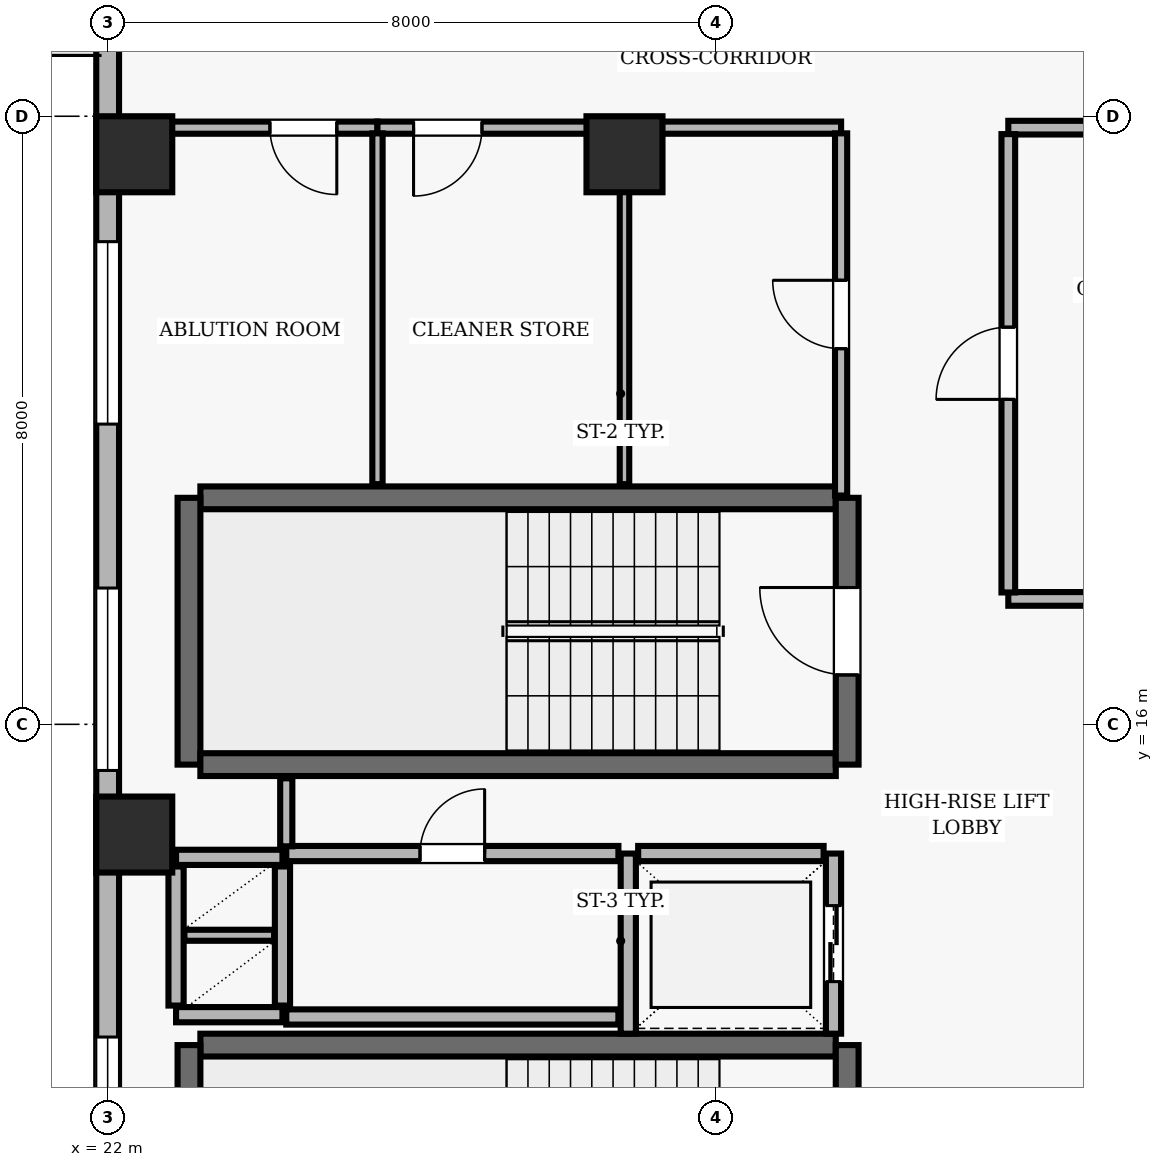
"""IFC4 building model, lengths in metres.
Left out: names, types, materials, properties, quantities, classifications, styles, units other than length and angle.
Written with IfcOpenShell. Run it as: python <this file> out.ifc"""

import sys

from ifc_helpers import new_model, si_unit, direction, frame, frame_2d, origin, origin_2d, place, context, subcontext, project, spatial, rectangle, extrude, element, fill, save


model = new_model("IFC4")
c1 = context("Model", 3, precision=1e-05, world=origin(), true_north=direction((0.0, 1.0)))
c2 = subcontext(c1, "Body", "Model", "MODEL_VIEW")
j1 = project(units=[si_unit("LENGTHUNIT", "METRE"), si_unit("PLANEANGLEUNIT", "RADIAN")], contexts=[c1])
p1 = place(None, origin())
s1 = spatial("IfcSite", under=j1, at=p1, CompositionType="ELEMENT")
p2 = place(p1, origin())
s2 = spatial("IfcBuilding", under=s1, at=p2, CompositionType="ELEMENT")
p3 = place(p2, frame((0.0, 0.0, 214.8)))
s3 = spatial("IfcBuildingStorey", under=s2, at=p3, CompositionType="ELEMENT", Elevation=214.8)
for number, where, z_axis, x_axis in (
    (1, (22.35, 14.55, 0.0), (0.0, 0.0, 1.0), (1.0, 0.0, 0.0)),
    (2, (22.35, 23.5, 0.0), (0.0, 0.0, 1.0), (1.0, 0.0, 0.0)),
    (3, (28.8, 23.5, 0.0), (0.0, 0.0, 1.0), (1.0, 0.0, 0.0)),
):
    element("IfcColumn", number, at=place(p3, frame(where, z_axis=z_axis, x_axis=x_axis)), inside=s3, PredefinedType="COLUMN", context=c2, shape_type="SweptSolid", body=[
        extrude(rectangle(XDim=1.0, YDim=1.0, at=origin_2d()), origin(), (0.0, 0.0, 1.0), 3.9),
    ])
p4 = place(p3, frame((22.0, 40.7, 0.0), z_axis=(0.0, 0.0, 1.0), x_axis=(0.0, -1.0, 0.0)))
e4 = element("IfcWall", 4, at=p4, inside=s3, PredefinedType="SOLIDWALL", context=c2, shape_type="SweptSolid", body=[
    extrude(rectangle(XDim=38.2, YDim=0.3, at=frame_2d((19.1, 0.0))), origin(), (0.0, 0.0, 1.0), 3.69),
])
p5 = place(p4, frame((7.8, 0.0, 0.0)))
e5 = element("IfcOpeningElement", 5, at=p5, cuts=e4, PredefinedType="OPENING", context=c2, shape_type="SweptSolid", body=[
    extrude(rectangle(XDim=1.0, YDim=2.2, at=frame_2d((0.5, 1.1))), frame((0.0, 0.16, 0.0), z_axis=(0.0, -1.0, 0.0), x_axis=(1.0, 0.0, 0.0)), (0.0, 0.0, 1.0), 0.32),
])
p6 = place(p4, frame((1.529, 0.0, 0.9)))
e6 = element("IfcOpeningElement", 6, at=p6, cuts=e4, PredefinedType="OPENING", context=c2, shape_type="SweptSolid", body=[
    extrude(rectangle(XDim=2.4, YDim=1.6, at=frame_2d((1.2, 0.8))), frame((0.0, 0.16, 0.0), z_axis=(0.0, -1.0, 0.0), x_axis=(1.0, 0.0, 0.0)), (0.0, 0.0, 1.0), 0.32),
])
p7 = place(p4, frame((11.543, 0.0, 0.9)))
e7 = element("IfcOpeningElement", 7, at=p7, cuts=e4, PredefinedType="OPENING", context=c2, shape_type="SweptSolid", body=[
    extrude(rectangle(XDim=2.4, YDim=1.6, at=frame_2d((1.2, 0.8))), frame((0.0, 0.16, 0.0), z_axis=(0.0, -1.0, 0.0), x_axis=(1.0, 0.0, 0.0)), (0.0, 0.0, 1.0), 0.32),
])
p8 = place(p4, frame((18.35, 0.0, 0.9)))
e8 = element("IfcOpeningElement", 8, at=p8, cuts=e4, PredefinedType="OPENING", context=c2, shape_type="SweptSolid", body=[
    extrude(rectangle(XDim=2.4, YDim=1.6, at=frame_2d((1.2, 0.8))), frame((0.0, 0.16, 0.0), z_axis=(0.0, -1.0, 0.0), x_axis=(1.0, 0.0, 0.0)), (0.0, 0.0, 1.0), 0.32),
])
p9 = place(p4, frame((22.907, 0.0, 0.9)))
e9 = element("IfcOpeningElement", 9, at=p9, cuts=e4, PredefinedType="OPENING", context=c2, shape_type="SweptSolid", body=[
    extrude(rectangle(XDim=2.4, YDim=1.6, at=frame_2d((1.2, 0.8))), frame((0.0, 0.16, 0.0), z_axis=(0.0, -1.0, 0.0), x_axis=(1.0, 0.0, 0.0)), (0.0, 0.0, 1.0), 0.32),
])
p10 = place(p4, frame((28.814, 0.0, 0.9)))
e10 = element("IfcOpeningElement", 10, at=p10, cuts=e4, PredefinedType="OPENING", context=c2, shape_type="SweptSolid", body=[
    extrude(rectangle(XDim=2.4, YDim=1.6, at=frame_2d((1.2, 0.8))), frame((0.0, 0.16, 0.0), z_axis=(0.0, -1.0, 0.0), x_axis=(1.0, 0.0, 0.0)), (0.0, 0.0, 1.0), 0.32),
])
p11 = place(p3, frame((31.58, 18.98, 0.0), z_axis=(0.0, 0.0, 1.0), x_axis=(-1.0, 0.0, 0.0)))
e11 = element("IfcWall", 11, at=p11, inside=s3, PredefinedType="SHEAR", context=c2, shape_type="SweptSolid", body=[
    extrude(rectangle(XDim=8.36, YDim=0.3, at=frame_2d((4.18, 0.0))), origin(), (0.0, 0.0, 1.0), 3.69),
])
p12 = place(p3, frame((23.07, 18.98, 0.0), z_axis=(0.0, 0.0, 1.0), x_axis=(0.0, -1.0, 0.0)))
e12 = element("IfcWall", 12, at=p12, inside=s3, PredefinedType="SHEAR", context=c2, shape_type="SweptSolid", body=[
    extrude(rectangle(XDim=3.51, YDim=0.3, at=frame_2d((1.755, 0.0))), origin(), (0.0, 0.0, 1.0), 3.69),
])
p13 = place(p3, frame((23.22, 15.47, 0.0), z_axis=(0.0, 0.0, 1.0), x_axis=(1.0, 0.0, 0.0)))
e13 = element("IfcWall", 13, at=p13, inside=s3, PredefinedType="SHEAR", context=c2, shape_type="SweptSolid", body=[
    extrude(rectangle(XDim=8.36, YDim=0.3, at=frame_2d((4.18, 0.0))), origin(), (0.0, 0.0, 1.0), 3.69),
])
p14 = place(p3, frame((31.73, 15.47, 0.0), z_axis=(0.0, 0.0, 1.0), x_axis=(0.0, 1.0, 0.0)))
e14 = element("IfcWall", 14, at=p14, inside=s3, PredefinedType="SHEAR", context=c2, shape_type="SweptSolid", body=[
    extrude(rectangle(XDim=3.51, YDim=0.3, at=frame_2d((1.755, 0.0))), origin(), (0.0, 0.0, 1.0), 3.69),
])
p15 = place(p14, frame((1.18, 0.0, 0.0)))
e15 = element("IfcOpeningElement", 15, at=p15, cuts=e14, PredefinedType="OPENING", context=c2, shape_type="SweptSolid", body=[
    extrude(rectangle(XDim=1.15, YDim=2.15, at=frame_2d((0.575, 1.075))), frame((0.0, 0.16, 0.0), z_axis=(0.0, -1.0, 0.0), x_axis=(1.0, 0.0, 0.0)), (0.0, 0.0, 1.0), 0.32),
])
p16 = place(p3, frame((31.58, 11.78, 0.0), z_axis=(0.0, 0.0, 1.0), x_axis=(-1.0, 0.0, 0.0)))
e16 = element("IfcWall", 16, at=p16, inside=s3, PredefinedType="SHEAR", context=c2, shape_type="SweptSolid", body=[
    extrude(rectangle(XDim=8.36, YDim=0.3, at=frame_2d((4.18, 0.0))), origin(), (0.0, 0.0, 1.0), 3.69),
])
p17 = place(p3, frame((23.07, 11.78, 0.0), z_axis=(0.0, 0.0, 1.0), x_axis=(0.0, -1.0, 0.0)))
e17 = element("IfcWall", 17, at=p17, inside=s3, PredefinedType="SHEAR", context=c2, shape_type="SweptSolid", body=[
    extrude(rectangle(XDim=3.51, YDim=0.3, at=frame_2d((1.755, 0.0))), origin(), (0.0, 0.0, 1.0), 3.69),
])
p18 = place(p3, frame((31.73, 8.27, 0.0), z_axis=(0.0, 0.0, 1.0), x_axis=(0.0, 1.0, 0.0)))
e18 = element("IfcWall", 18, at=p18, inside=s3, PredefinedType="SHEAR", context=c2, shape_type="SweptSolid", body=[
    extrude(rectangle(XDim=3.51, YDim=0.3, at=frame_2d((1.755, 0.0))), origin(), (0.0, 0.0, 1.0), 3.69),
])
p19 = place(p18, frame((1.18, 0.0, 0.0)))
e19 = element("IfcOpeningElement", 19, at=p19, cuts=e18, PredefinedType="OPENING", context=c2, shape_type="SweptSolid", body=[
    extrude(rectangle(XDim=1.15, YDim=2.15, at=frame_2d((0.575, 1.075))), frame((0.0, 0.16, 0.0), z_axis=(0.0, -1.0, 0.0), x_axis=(1.0, 0.0, 0.0)), (0.0, 0.0, 1.0), 0.32),
])
p20 = place(p3, frame((28.85, 14.3, 0.0), z_axis=(0.0, 0.0, 1.0), x_axis=(0.0, -1.0, 0.0)))
e20 = element("IfcWall", 20, at=p20, inside=s3, PredefinedType="SOLIDWALL", context=c2, shape_type="SweptSolid", body=[
    extrude(rectangle(XDim=2.37, YDim=0.2, at=frame_2d((1.185, 0.0))), origin(), (0.0, 0.0, 1.0), 3.69),
])
p21 = place(p3, frame((31.55, 11.93, 0.0), z_axis=(0.0, 0.0, 1.0), x_axis=(0.0, 1.0, 0.0)))
e21 = element("IfcWall", 21, at=p21, inside=s3, PredefinedType="SOLIDWALL", context=c2, shape_type="SweptSolid", body=[
    extrude(rectangle(XDim=2.37, YDim=0.2, at=frame_2d((1.185, 0.0))), origin(), (0.0, 0.0, 1.0), 3.69),
])
p22 = place(p21, frame((0.685, 0.0, 0.0)))
e22 = element("IfcOpeningElement", 22, at=p22, cuts=e21, PredefinedType="OPENING", context=c2, shape_type="SweptSolid", body=[
    extrude(rectangle(XDim=1.0, YDim=2.1, at=frame_2d((0.5, 1.05))), frame((0.0, 0.11, 0.0), z_axis=(0.0, -1.0, 0.0), x_axis=(1.0, 0.0, 0.0)), (0.0, 0.0, 1.0), 0.22),
])
p23 = place(p3, frame((31.42, 14.3, 0.0), z_axis=(0.0, 0.0, 1.0), x_axis=(-1.0, 0.0, 0.0)))
e23 = element("IfcWall", 23, at=p23, inside=s3, PredefinedType="SOLIDWALL", context=c2, shape_type="SweptSolid", body=[
    extrude(rectangle(XDim=2.44, YDim=0.2, at=frame_2d((1.22, 0.0))), origin(), (0.0, 0.0, 1.0), 3.69),
])
for number, where, z_axis, x_axis in (
    (24, (22.9, 14.25, 0.0), (0.0, 0.0, 1.0), (1.0, 0.0, 0.0)),
    (25, (22.9, 12.18, 0.0), (0.0, 0.0, 1.0), (1.0, 0.0, 0.0)),
):
    element("IfcWall", number, at=place(p3, frame(where, z_axis=z_axis, x_axis=x_axis)), inside=s3, PredefinedType="SOLIDWALL", context=c2, shape_type="SweptSolid", body=[
        extrude(rectangle(XDim=1.4, YDim=0.2, at=frame_2d((0.7, 0.0))), origin(), (0.0, 0.0, 1.0), 3.69),
    ])
for number, where, z_axis, x_axis in (
    (26, (24.3, 12.3, 0.0), (0.0, 0.0, 1.0), (0.0, 1.0, 0.0)),
    (27, (22.9, 12.3, 0.0), (0.0, 0.0, 1.0), (0.0, 1.0, 0.0)),
):
    element("IfcWall", number, at=place(p3, frame(where, z_axis=z_axis, x_axis=x_axis)), inside=s3, PredefinedType="SOLIDWALL", context=c2, shape_type="SweptSolid", body=[
        extrude(rectangle(XDim=1.83, YDim=0.2, at=frame_2d((0.915, 0.0))), origin(), (0.0, 0.0, 1.0), 3.69),
    ])
p24 = place(p3, frame((23.01, 13.225, 0.0), z_axis=(0.0, 0.0, 1.0), x_axis=(1.0, 0.0, 0.0)))
e28 = element("IfcWall", 28, at=p24, inside=s3, PredefinedType="PARTITIONING", context=c2, shape_type="SweptSolid", body=[
    extrude(rectangle(XDim=1.18, YDim=0.145, at=frame_2d((0.59, 0.0))), origin(), (0.0, 0.0, 1.0), 3.69),
])
p25 = place(p3, frame((24.35, 12.15, 0.0), z_axis=(0.0, 0.0, 1.0), x_axis=(1.0, 0.0, 0.0)))
e29 = element("IfcWall", 29, at=p25, inside=s3, PredefinedType="SOLIDWALL", context=c2, shape_type="SweptSolid", body=[
    extrude(rectangle(XDim=4.37, YDim=0.2, at=frame_2d((2.185, 0.0))), origin(), (0.0, 0.0, 1.0), 3.69),
])
p26 = place(p3, frame((24.35, 14.3, 0.0), z_axis=(0.0, 0.0, 1.0), x_axis=(1.0, 0.0, 0.0)))
e30 = element("IfcWall", 30, at=p26, inside=s3, PredefinedType="SOLIDWALL", context=c2, shape_type="SweptSolid", body=[
    extrude(rectangle(XDim=4.37, YDim=0.2, at=frame_2d((2.185, 0.0))), origin(), (0.0, 0.0, 1.0), 3.69),
])
p27 = place(p26, frame((1.76, 0.0, 0.0)))
e31 = element("IfcOpeningElement", 31, at=p27, cuts=e30, PredefinedType="OPENING", context=c2, shape_type="SweptSolid", body=[
    extrude(rectangle(XDim=0.85, YDim=2.1, at=frame_2d((0.425, 1.05))), frame((0.0, 0.11, 0.0), z_axis=(0.0, -1.0, 0.0), x_axis=(1.0, 0.0, 0.0)), (0.0, 0.0, 1.0), 0.22),
])
p28 = place(p3, frame((25.55, 23.85, 0.0), z_axis=(0.0, 0.0, 1.0), x_axis=(-1.0, 0.0, 0.0)))
e32 = element("IfcWall", 32, at=p28, inside=s3, PredefinedType="PARTITIONING", context=c2, shape_type="SweptSolid", body=[
    extrude(rectangle(XDim=3.35, YDim=0.16, at=frame_2d((1.675, 0.0))), origin(), (0.0, 0.0, 1.0), 3.139),
])
p29 = place(p28, frame((0.535, 0.0, 0.0)))
e33 = element("IfcOpeningElement", 33, at=p29, cuts=e32, PredefinedType="OPENING", context=c2, shape_type="SweptSolid", body=[
    extrude(rectangle(XDim=0.88, YDim=2.1, at=frame_2d((0.44, 1.05))), frame((0.0, 0.09, 0.0), z_axis=(0.0, -1.0, 0.0), x_axis=(1.0, 0.0, 0.0)), (0.0, 0.0, 1.0), 0.18),
])
p30 = place(p3, frame((28.8, 23.85, 0.0), z_axis=(0.0, 0.0, 1.0), x_axis=(-1.0, 0.0, 0.0)))
e34 = element("IfcWall", 34, at=p30, inside=s3, PredefinedType="PARTITIONING", context=c2, shape_type="SweptSolid", body=[
    extrude(rectangle(XDim=3.25, YDim=0.16, at=frame_2d((1.625, 0.0))), origin(), (0.0, 0.0, 1.0), 3.139),
])
p31 = place(p30, frame((1.875, 0.0, 0.0)))
e35 = element("IfcOpeningElement", 35, at=p31, cuts=e34, PredefinedType="OPENING", context=c2, shape_type="SweptSolid", body=[
    extrude(rectangle(XDim=0.9, YDim=2.1, at=frame_2d((0.45, 1.05))), frame((0.0, 0.09, 0.0), z_axis=(0.0, -1.0, 0.0), x_axis=(1.0, 0.0, 0.0)), (0.0, 0.0, 1.0), 0.18),
])
p32 = place(p3, frame((31.65, 23.85, 0.0), z_axis=(0.0, 0.0, 1.0), x_axis=(-1.0, 0.0, 0.0)))
e36 = element("IfcWall", 36, at=p32, inside=s3, PredefinedType="PARTITIONING", context=c2, shape_type="SweptSolid", body=[
    extrude(rectangle(XDim=2.85, YDim=0.16, at=frame_2d((1.425, 0.0))), origin(), (0.0, 0.0, 1.0), 3.139),
])
p33 = place(p3, frame((33.85, 17.65, 0.0), z_axis=(0.0, 0.0, 1.0), x_axis=(1.0, 0.0, 0.0)))
e37 = element("IfcWall", 37, at=p33, inside=s3, PredefinedType="PARTITIONING", context=c2, shape_type="SweptSolid", body=[
    extrude(rectangle(XDim=1.3, YDim=0.18, at=frame_2d((0.65, 0.0))), origin(), (0.0, 0.0, 1.0), 3.69),
])
p34 = place(p3, frame((37.85, 23.85, 0.0), z_axis=(0.0, 0.0, 1.0), x_axis=(-1.0, 0.0, 0.0)))
e38 = element("IfcWall", 38, at=p34, inside=s3, PredefinedType="PARTITIONING", context=c2, shape_type="SweptSolid", body=[
    extrude(rectangle(XDim=4.0, YDim=0.18, at=frame_2d((2.0, 0.0))), origin(), (0.0, 0.0, 1.0), 3.139),
])
p35 = place(p3, frame((24.35, 15.29, 0.0), z_axis=(0.0, 0.0, 1.0), x_axis=(0.0, -1.0, 0.0)))
e39 = element("IfcWall", 39, at=p35, inside=s3, PredefinedType="PARTITIONING", context=c2, shape_type="SweptSolid", body=[
    extrude(rectangle(XDim=0.895, YDim=0.16, at=frame_2d((0.448, 0.0))), origin(), (0.0, 0.0, 1.0), 3.69),
])
p36 = place(p3, frame((25.55, 19.16, 0.0), z_axis=(0.0, 0.0, 1.0), x_axis=(0.0, 1.0, 0.0)))
e40 = element("IfcWall", 40, at=p36, inside=s3, PredefinedType="PARTITIONING", context=c2, shape_type="SweptSolid", body=[
    extrude(rectangle(XDim=4.615, YDim=0.135, at=frame_2d((2.308, 0.0))), origin(), (0.0, 0.0, 1.0), 3.69),
])
p37 = place(p3, frame((28.8, 23.775, 0.0), z_axis=(0.0, 0.0, 1.0), x_axis=(0.0, -1.0, 0.0)))
e41 = element("IfcWall", 41, at=p37, inside=s3, PredefinedType="PARTITIONING", context=c2, shape_type="SweptSolid", body=[
    extrude(rectangle(XDim=4.615, YDim=0.125, at=frame_2d((2.308, 0.0))), origin(), (0.0, 0.0, 1.0), 3.69),
])
p38 = place(p3, frame((31.65, 19.01, 0.0), z_axis=(0.0, 0.0, 1.0), x_axis=(0.0, 1.0, 0.0)))
e42 = element("IfcWall", 42, at=p38, inside=s3, PredefinedType="PARTITIONING", context=c2, shape_type="SweptSolid", body=[
    extrude(rectangle(XDim=4.765, YDim=0.16, at=frame_2d((2.382, 0.0))), origin(), (0.0, 0.0, 1.0), 3.69),
])
p39 = place(p38, frame((1.932, 0.0, 0.0)))
e43 = element("IfcOpeningElement", 43, at=p39, cuts=e42, PredefinedType="OPENING", context=c2, shape_type="SweptSolid", body=[
    extrude(rectangle(XDim=0.9, YDim=2.1, at=frame_2d((0.45, 1.05))), frame((0.0, 0.09, 0.0), z_axis=(0.0, -1.0, 0.0), x_axis=(1.0, 0.0, 0.0)), (0.0, 0.0, 1.0), 0.18),
])
p40 = place(p3, frame((33.85, 17.735, 0.0), z_axis=(0.0, 0.0, 1.0), x_axis=(0.0, 1.0, 0.0)))
e44 = element("IfcWall", 44, at=p40, inside=s3, PredefinedType="PARTITIONING", context=c2, shape_type="SweptSolid", body=[
    extrude(rectangle(XDim=6.03, YDim=0.18, at=frame_2d((3.015, 0.0))), origin(), (0.0, 0.0, 1.0), 3.69),
])
p41 = place(p40, frame((2.54, 0.0, 0.0)))
e45 = element("IfcOpeningElement", 45, at=p41, cuts=e44, PredefinedType="OPENING", context=c2, shape_type="SweptSolid", body=[
    extrude(rectangle(XDim=0.95, YDim=2.1, at=frame_2d((0.475, 1.05))), frame((0.0, 0.1, 0.0), z_axis=(0.0, -1.0, 0.0), x_axis=(1.0, 0.0, 0.0)), (0.0, 0.0, 1.0), 0.2),
])
p42 = place(p8, origin())
e46 = element("IfcWindow", 46, at=p42, inside=s3, PartitioningType="SINGLE_PANEL", PredefinedType="WINDOW", context=c2, shape_type="SweptSolid", body=[
    extrude(rectangle(XDim=2.4, YDim=1.6, at=frame_2d((1.2, 0.8))), frame((0.0, 0.03, 0.0), z_axis=(0.0, -1.0, 0.0), x_axis=(1.0, 0.0, 0.0)), (0.0, 0.0, 1.0), 0.06),
])
fill(e8, e46)
p43 = place(p9, origin())
e47 = element("IfcWindow", 47, at=p43, inside=s3, PartitioningType="SINGLE_PANEL", PredefinedType="WINDOW", context=c2, shape_type="SweptSolid", body=[
    extrude(rectangle(XDim=2.4, YDim=1.6, at=frame_2d((1.2, 0.8))), frame((0.0, 0.03, 0.0), z_axis=(0.0, -1.0, 0.0), x_axis=(1.0, 0.0, 0.0)), (0.0, 0.0, 1.0), 0.06),
])
fill(e9, e47)
p44 = place(p10, origin())
e48 = element("IfcWindow", 48, at=p44, inside=s3, PartitioningType="SINGLE_PANEL", PredefinedType="WINDOW", context=c2, shape_type="SweptSolid", body=[
    extrude(rectangle(XDim=2.4, YDim=1.6, at=frame_2d((1.2, 0.8))), frame((0.0, 0.03, 0.0), z_axis=(0.0, -1.0, 0.0), x_axis=(1.0, 0.0, 0.0)), (0.0, 0.0, 1.0), 0.06),
])
fill(e10, e48)
p45 = place(p15, origin())
e49 = element("IfcDoor", 49, at=p45, inside=s3, OperationType="SINGLE_SWING_RIGHT", PredefinedType="DOOR", context=c2, shape_type="SweptSolid", body=[
    extrude(rectangle(XDim=1.15, YDim=2.15, at=frame_2d((0.575, 1.075))), frame((0.0, 0.025, 0.0), z_axis=(0.0, -1.0, 0.0), x_axis=(1.0, 0.0, 0.0)), (0.0, 0.0, 1.0), 0.05),
])
fill(e15, e49)
p46 = place(p22, origin())
e50 = element("IfcDoor", 50, at=p46, inside=s3, OperationType="DOUBLE_DOOR_SLIDING", PredefinedType="DOOR", context=c2, shape_type="SweptSolid", body=[
    extrude(rectangle(XDim=1.0, YDim=2.1, at=frame_2d((0.5, 1.05))), frame((0.0, 0.025, 0.0), z_axis=(0.0, -1.0, 0.0), x_axis=(1.0, 0.0, 0.0)), (0.0, 0.0, 1.0), 0.05),
])
fill(e22, e50)
p47 = place(p41, origin())
e51 = element("IfcDoor", 51, at=p47, inside=s3, OperationType="SINGLE_SWING_LEFT", PredefinedType="DOOR", context=c2, shape_type="SweptSolid", body=[
    extrude(rectangle(XDim=0.95, YDim=2.1, at=frame_2d((0.475, 1.05))), frame((0.0, 0.025, 0.0), z_axis=(0.0, -1.0, 0.0), x_axis=(1.0, 0.0, 0.0)), (0.0, 0.0, 1.0), 0.05),
])
fill(e45, e51)
p48 = place(p39, origin())
e52 = element("IfcDoor", 52, at=p48, inside=s3, OperationType="SINGLE_SWING_RIGHT", PredefinedType="DOOR", context=c2, shape_type="SweptSolid", body=[
    extrude(rectangle(XDim=0.9, YDim=2.1, at=frame_2d((0.45, 1.05))), frame((0.0, 0.025, 0.0), z_axis=(0.0, -1.0, 0.0), x_axis=(1.0, 0.0, 0.0)), (0.0, 0.0, 1.0), 0.05),
])
fill(e43, e52)
p49 = place(p27, origin())
e53 = element("IfcDoor", 53, at=p49, inside=s3, OperationType="SINGLE_SWING_RIGHT", PredefinedType="DOOR", context=c2, shape_type="SweptSolid", body=[
    extrude(rectangle(XDim=0.85, YDim=2.1, at=frame_2d((0.425, 1.05))), frame((0.0, 0.025, 0.0), z_axis=(0.0, -1.0, 0.0), x_axis=(1.0, 0.0, 0.0)), (0.0, 0.0, 1.0), 0.05),
])
fill(e31, e53)
p50 = place(p29, origin())
e54 = element("IfcDoor", 54, at=p50, inside=s3, OperationType="SINGLE_SWING_LEFT", PredefinedType="DOOR", context=c2, shape_type="SweptSolid", body=[
    extrude(rectangle(XDim=0.88, YDim=2.1, at=frame_2d((0.44, 1.05))), frame((0.0, 0.025, 0.0), z_axis=(0.0, -1.0, 0.0), x_axis=(1.0, 0.0, 0.0)), (0.0, 0.0, 1.0), 0.05),
])
fill(e33, e54)
p51 = place(p31, origin())
e55 = element("IfcDoor", 55, at=p51, inside=s3, OperationType="SINGLE_SWING_RIGHT", PredefinedType="DOOR", context=c2, shape_type="SweptSolid", body=[
    extrude(rectangle(XDim=0.9, YDim=2.1, at=frame_2d((0.45, 1.05))), frame((0.0, 0.025, 0.0), z_axis=(0.0, -1.0, 0.0), x_axis=(1.0, 0.0, 0.0)), (0.0, 0.0, 1.0), 0.05),
])
fill(e35, e55)
save(model, sys.argv[1])
